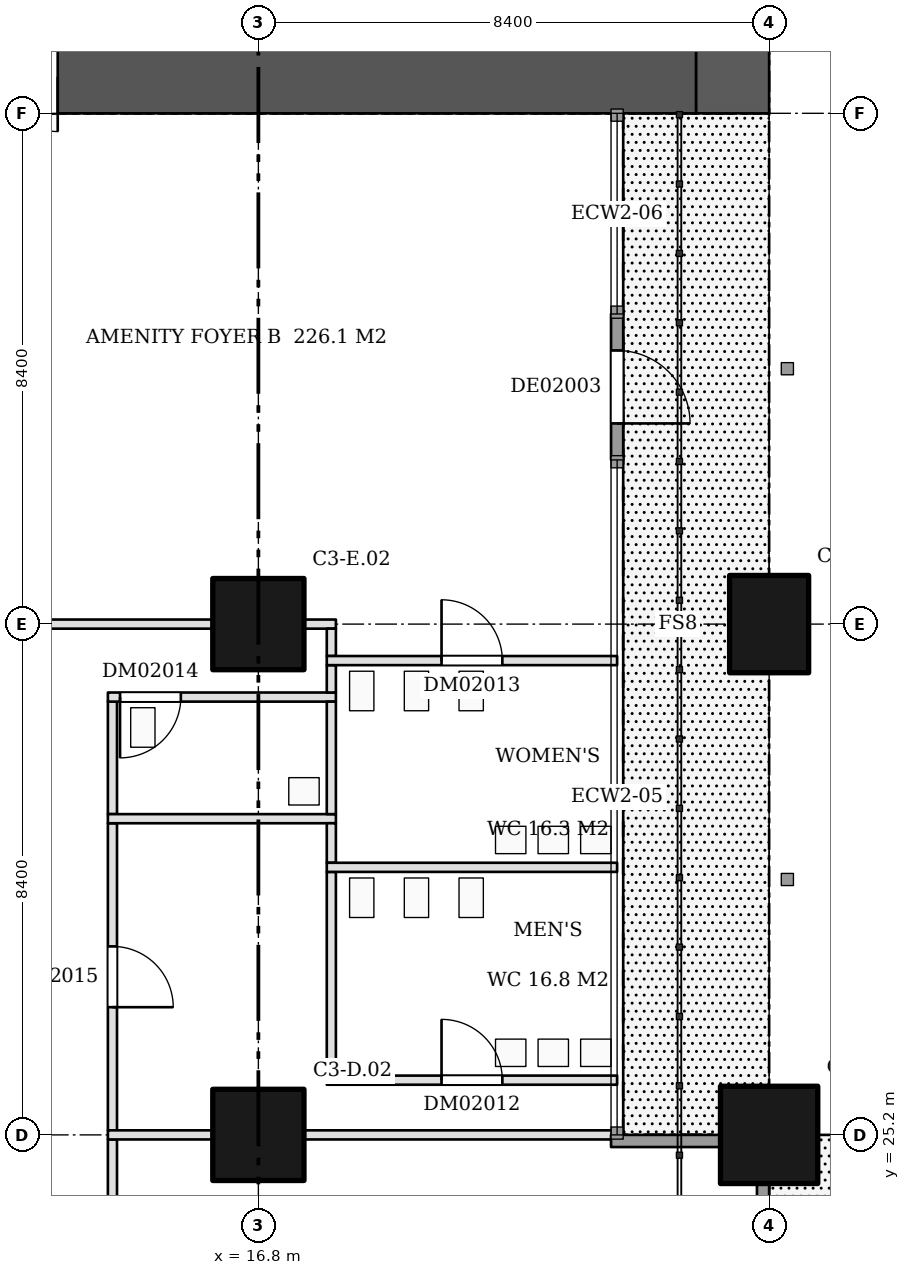
"""IFC4 building model, lengths in metres.
Left out: names, types, materials, properties, quantities, classifications, styles, units other than length and angle.
Written with IfcOpenShell. Run it as: python <this file> out.ifc"""

import sys

from ifc_helpers import new_model, si_unit, direction, frame, frame_2d, origin, origin_2d, place, context, subcontext, project, spatial, rectangle, extrude, element, fill, save


model = new_model("IFC4")
c1 = context("Model", 3, precision=1e-05, world=origin(), true_north=direction((0.0, 1.0)))
c2 = subcontext(c1, "Body", "Model", "MODEL_VIEW")
j1 = project(units=[si_unit("LENGTHUNIT", "METRE"), si_unit("PLANEANGLEUNIT", "RADIAN")], contexts=[c1])
p1 = place(None, origin())
s1 = spatial("IfcSite", under=j1, at=p1, CompositionType="ELEMENT")
p2 = place(p1, origin())
s2 = spatial("IfcBuilding", under=s1, at=p2, CompositionType="ELEMENT")
p3 = place(p2, frame((0.0, 0.0, 14.4)))
s3 = spatial("IfcBuildingStorey", under=s2, at=p3, CompositionType="ELEMENT", Elevation=14.4)
for number, where, z_axis, x_axis in (
    (1, (16.8, 25.2, 0.0), (0.0, 0.0, 1.0), (1.0, 0.0, 0.0)),
    (2, (16.8, 33.6, 0.0), (0.0, 0.0, 1.0), (1.0, 0.0, 0.0)),
):
    element("IfcColumn", number, at=place(p3, frame(where, z_axis=z_axis, x_axis=x_axis)), inside=s3, PredefinedType="COLUMN", context=c2, shape_type="SweptSolid", body=[
        extrude(rectangle(XDim=1.5, YDim=1.5, at=origin_2d()), origin(), (0.0, 0.0, 1.0), 5.1),
    ])
p4 = place(p3, frame((25.2, 25.2, 0.0), z_axis=(0.0, 0.0, 1.0), x_axis=(1.0, 0.0, 0.0)))
e3 = element("IfcColumn", 3, at=p4, inside=s3, PredefinedType="COLUMN", context=c2, shape_type="SweptSolid", body=[
    extrude(rectangle(XDim=1.6, YDim=1.6, at=origin_2d()), origin(), (0.0, 0.0, 1.0), 5.1),
])
p5 = place(p3, frame((25.2, 33.6, 0.0), z_axis=(0.0, 0.0, 1.0), x_axis=(0.0, 1.0, 0.0)))
e4 = element("IfcColumn", 4, at=p5, inside=s3, PredefinedType="COLUMN", context=c2, shape_type="SweptSolid", body=[
    extrude(rectangle(XDim=1.6, YDim=1.3, at=origin_2d()), origin(), (0.0, 0.0, 1.0), 5.1),
])
p6 = place(p3, frame((24.6, 58.8, 0.0), z_axis=(0.0, 0.0, 1.0), x_axis=(0.0, -1.0, 0.0)))
e5 = element("IfcWall", 5, at=p6, inside=s3, PredefinedType="SHEAR", context=c2, shape_type="SweptSolid", body=[
    extrude(rectangle(XDim=16.8, YDim=1.2, at=frame_2d((8.4, 0.0))), origin(), (0.0, 0.0, 1.0), 5.1),
])
p7 = place(p6, frame((1.8, 0.0, 0.5)))
e6 = element("IfcOpeningElement", 6, at=p7, cuts=e5, PredefinedType="OPENING", context=c2, shape_type="SweptSolid", body=[
    extrude(rectangle(XDim=1.8, YDim=2.4, at=frame_2d((0.9, 1.2))), frame((0.0, 0.61, 0.0), z_axis=(0.0, -1.0, 0.0), x_axis=(1.0, 0.0, 0.0)), (0.0, 0.0, 1.0), 1.22),
])
p8 = place(p6, frame((4.644, 0.0, 1.6)))
e7 = element("IfcOpeningElement", 7, at=p8, cuts=e5, PredefinedType="OPENING", context=c2, shape_type="SweptSolid", body=[
    extrude(rectangle(XDim=1.2, YDim=1.2, at=frame_2d((0.6, 0.6))), frame((0.0, 0.61, 0.0), z_axis=(0.0, -1.0, 0.0), x_axis=(1.0, 0.0, 0.0)), (0.0, 0.0, 1.0), 1.22),
])
p9 = place(p6, frame((6.45, 0.0, 1.6)))
e8 = element("IfcOpeningElement", 8, at=p9, cuts=e5, PredefinedType="OPENING", context=c2, shape_type="SweptSolid", body=[
    extrude(rectangle(XDim=1.8, YDim=1.2, at=frame_2d((0.9, 0.6))), frame((0.0, 0.61, 0.0), z_axis=(0.0, -1.0, 0.0), x_axis=(1.0, 0.0, 0.0)), (0.0, 0.0, 1.0), 1.22),
])
p10 = place(p6, frame((12.65, 0.0, 0.5)))
e9 = element("IfcOpeningElement", 9, at=p10, cuts=e5, PredefinedType="OPENING", context=c2, shape_type="SweptSolid", body=[
    extrude(rectangle(XDim=1.8, YDim=2.4, at=frame_2d((0.9, 1.2))), frame((0.0, 0.61, 0.0), z_axis=(0.0, -1.0, 0.0), x_axis=(1.0, 0.0, 0.0)), (0.0, 0.0, 1.0), 1.22),
])
p11 = place(p3, frame((9.6, 42.6, 0.0), z_axis=(0.0, 0.0, 1.0), x_axis=(1.0, 0.0, 0.0)))
e10 = element("IfcWall", 10, at=p11, inside=s3, PredefinedType="SHEAR", context=c2, shape_type="SweptSolid", body=[
    extrude(rectangle(XDim=14.4, YDim=1.2, at=frame_2d((7.2, 0.0))), origin(), (0.0, 0.0, 1.0), 5.1),
])
p12 = place(p11, frame((2.1, 0.0, 0.0)))
e11 = element("IfcOpeningElement", 11, at=p12, cuts=e10, PredefinedType="OPENING", context=c2, shape_type="SweptSolid", body=[
    extrude(rectangle(XDim=1.8, YDim=2.1, at=frame_2d((0.9, 1.05))), frame((0.0, 0.61, 0.0), z_axis=(0.0, -1.0, 0.0), x_axis=(1.0, 0.0, 0.0)), (0.0, 0.0, 1.0), 1.22),
])
p13 = place(p3, frame((10.8, 33.6, 0.0), z_axis=(0.0, 0.0, 1.0), x_axis=(1.0, 0.0, 0.0)))
e12 = element("IfcWall", 12, at=p13, inside=s3, PredefinedType="PARTITIONING", context=c2, shape_type="SweptSolid", body=[
    extrude(rectangle(XDim=5.25, YDim=0.15, at=frame_2d((2.625, 0.0))), origin(), (0.0, 0.0, 1.0), 5.1),
])
p14 = place(p3, frame((17.55, 33.6, 0.0), z_axis=(0.0, 0.0, 1.0), x_axis=(1.0, 0.0, 0.0)))
e13 = element("IfcWall", 13, at=p14, inside=s3, PredefinedType="PARTITIONING", context=c2, shape_type="SweptSolid", body=[
    extrude(rectangle(XDim=0.525, YDim=0.15, at=frame_2d((0.262, 0.0))), origin(), (0.0, 0.0, 1.0), 5.1),
])
p15 = place(p3, frame((14.4, 20.8, 0.0), z_axis=(0.0, 0.0, 1.0), x_axis=(0.0, 1.0, 0.0)))
e14 = element("IfcWall", 14, at=p15, inside=s3, PredefinedType="PARTITIONING", context=c2, shape_type="SweptSolid", body=[
    extrude(rectangle(XDim=4.325, YDim=0.15, at=frame_2d((2.163, 0.0))), origin(), (0.0, 0.0, 1.0), 5.1),
])
p16 = place(p15, frame((1.262, 0.0, 0.0)))
e15 = element("IfcOpeningElement", 15, at=p16, cuts=e14, PredefinedType="OPENING", context=c2, shape_type="SweptSolid", body=[
    extrude(rectangle(XDim=1.8, YDim=2.1, at=frame_2d((0.9, 1.05))), frame((0.0, 0.085, 0.0), z_axis=(0.0, -1.0, 0.0), x_axis=(1.0, 0.0, 0.0)), (0.0, 0.0, 1.0), 0.17),
])
p17 = place(p3, frame((14.4, 25.275, 0.0), z_axis=(0.0, 0.0, 1.0), x_axis=(0.0, 1.0, 0.0)))
e16 = element("IfcWall", 16, at=p17, inside=s3, PredefinedType="PARTITIONING", context=c2, shape_type="SweptSolid", body=[
    extrude(rectangle(XDim=5.05, YDim=0.15, at=frame_2d((2.525, 0.0))), origin(), (0.0, 0.0, 1.0), 5.1),
])
p18 = place(p17, frame((2.025, 0.0, 0.0)))
e17 = element("IfcOpeningElement", 17, at=p18, cuts=e16, PredefinedType="OPENING", context=c2, shape_type="SweptSolid", body=[
    extrude(rectangle(XDim=1.0, YDim=2.1, at=frame_2d((0.5, 1.05))), frame((0.0, 0.085, 0.0), z_axis=(0.0, -1.0, 0.0), x_axis=(1.0, 0.0, 0.0)), (0.0, 0.0, 1.0), 0.17),
])
p19 = place(p3, frame((14.325, 25.2, 0.0), z_axis=(0.0, 0.0, 1.0), x_axis=(1.0, 0.0, 0.0)))
e18 = element("IfcWall", 18, at=p19, inside=s3, PredefinedType="PARTITIONING", context=c2, shape_type="SweptSolid", body=[
    extrude(rectangle(XDim=1.725, YDim=0.15, at=frame_2d((0.863, 0.0))), origin(), (0.0, 0.0, 1.0), 5.1),
])
p20 = place(p3, frame((17.55, 25.2, 0.0), z_axis=(0.0, 0.0, 1.0), x_axis=(1.0, 0.0, 0.0)))
e19 = element("IfcWall", 19, at=p20, inside=s3, PredefinedType="PARTITIONING", context=c2, shape_type="SweptSolid", body=[
    extrude(rectangle(XDim=5.15, YDim=0.15, at=frame_2d((2.575, 0.0))), origin(), (0.0, 0.0, 1.0), 5.1),
])
p21 = place(p3, frame((14.4, 30.475, 0.0), z_axis=(0.0, 0.0, 1.0), x_axis=(0.0, 1.0, 0.0)))
e20 = element("IfcWall", 20, at=p21, inside=s3, PredefinedType="PARTITIONING", context=c2, shape_type="SweptSolid", body=[
    extrude(rectangle(XDim=1.85, YDim=0.15, at=frame_2d((0.925, 0.0))), origin(), (0.0, 0.0, 1.0), 5.1),
])
p22 = place(p3, frame((14.325, 30.4, 0.0), z_axis=(0.0, 0.0, 1.0), x_axis=(1.0, 0.0, 0.0)))
e21 = element("IfcWall", 21, at=p22, inside=s3, PredefinedType="PARTITIONING", context=c2, shape_type="SweptSolid", body=[
    extrude(rectangle(XDim=3.75, YDim=0.15, at=frame_2d((1.875, 0.0))), origin(), (0.0, 0.0, 1.0), 5.1),
])
p23 = place(p3, frame((14.325, 32.4, 0.0), z_axis=(0.0, 0.0, 1.0), x_axis=(1.0, 0.0, 0.0)))
e22 = element("IfcWall", 22, at=p23, inside=s3, PredefinedType="PARTITIONING", context=c2, shape_type="SweptSolid", body=[
    extrude(rectangle(XDim=3.75, YDim=0.15, at=frame_2d((1.875, 0.0))), origin(), (0.0, 0.0, 1.0), 5.1),
])
p24 = place(p23, frame((0.2, 0.0, 0.0)))
e23 = element("IfcOpeningElement", 23, at=p24, cuts=e22, PredefinedType="OPENING", context=c2, shape_type="SweptSolid", body=[
    extrude(rectangle(XDim=1.0, YDim=2.1, at=frame_2d((0.5, 1.05))), frame((0.0, 0.085, 0.0), z_axis=(0.0, -1.0, 0.0), x_axis=(1.0, 0.0, 0.0)), (0.0, 0.0, 1.0), 0.17),
])
p25 = place(p3, frame((18.0, 26.175, 0.0), z_axis=(0.0, 0.0, 1.0), x_axis=(0.0, 1.0, 0.0)))
e24 = element("IfcWall", 24, at=p25, inside=s3, PredefinedType="PARTITIONING", context=c2, shape_type="SweptSolid", body=[
    extrude(rectangle(XDim=3.35, YDim=0.15, at=frame_2d((1.675, 0.0))), origin(), (0.0, 0.0, 1.0), 5.1),
])
p26 = place(p3, frame((17.925, 26.1, 0.0), z_axis=(0.0, 0.0, 1.0), x_axis=(1.0, 0.0, 0.0)))
e25 = element("IfcWall", 25, at=p26, inside=s3, PredefinedType="PARTITIONING", context=c2, shape_type="SweptSolid", body=[
    extrude(rectangle(XDim=4.775, YDim=0.15, at=frame_2d((2.387, 0.0))), origin(), (0.0, 0.0, 1.0), 5.1),
])
p27 = place(p26, frame((1.887, 0.0, 0.0)))
e26 = element("IfcOpeningElement", 26, at=p27, cuts=e25, PredefinedType="OPENING", context=c2, shape_type="SweptSolid", body=[
    extrude(rectangle(XDim=1.0, YDim=2.1, at=frame_2d((0.5, 1.05))), frame((0.0, 0.085, 0.0), z_axis=(0.0, -1.0, 0.0), x_axis=(1.0, 0.0, 0.0)), (0.0, 0.0, 1.0), 0.17),
])
p28 = place(p3, frame((18.0, 29.675, 0.0), z_axis=(0.0, 0.0, 1.0), x_axis=(0.0, 1.0, 0.0)))
e27 = element("IfcWall", 27, at=p28, inside=s3, PredefinedType="PARTITIONING", context=c2, shape_type="SweptSolid", body=[
    extrude(rectangle(XDim=0.65, YDim=0.15, at=frame_2d((0.325, 0.0))), origin(), (0.0, 0.0, 1.0), 5.1),
])
p29 = place(p3, frame((17.925, 29.6, 0.0), z_axis=(0.0, 0.0, 1.0), x_axis=(1.0, 0.0, 0.0)))
e28 = element("IfcWall", 28, at=p29, inside=s3, PredefinedType="PARTITIONING", context=c2, shape_type="SweptSolid", body=[
    extrude(rectangle(XDim=4.775, YDim=0.15, at=frame_2d((2.387, 0.0))), origin(), (0.0, 0.0, 1.0), 5.1),
])
p30 = place(p3, frame((18.0, 30.475, 0.0), z_axis=(0.0, 0.0, 1.0), x_axis=(0.0, 1.0, 0.0)))
e29 = element("IfcWall", 29, at=p30, inside=s3, PredefinedType="PARTITIONING", context=c2, shape_type="SweptSolid", body=[
    extrude(rectangle(XDim=1.85, YDim=0.15, at=frame_2d((0.925, 0.0))), origin(), (0.0, 0.0, 1.0), 5.1),
])
for number, where, z_axis, x_axis in (
    (30, (18.0, 32.475, 0.0), (0.0, 0.0, 1.0), (0.0, 1.0, 0.0)),
    (31, (18.0, 33.075, 0.0), (0.0, 0.0, 1.0), (0.0, 1.0, 0.0)),
):
    element("IfcWall", number, at=place(p3, frame(where, z_axis=z_axis, x_axis=x_axis)), inside=s3, PredefinedType="PARTITIONING", context=c2, shape_type="SweptSolid", body=[
        extrude(rectangle(XDim=0.45, YDim=0.15, at=frame_2d((0.225, 0.0))), origin(), (0.0, 0.0, 1.0), 5.1),
    ])
p31 = place(p3, frame((17.925, 33.0, 0.0), z_axis=(0.0, 0.0, 1.0), x_axis=(1.0, 0.0, 0.0)))
e32 = element("IfcWall", 32, at=p31, inside=s3, PredefinedType="PARTITIONING", context=c2, shape_type="SweptSolid", body=[
    extrude(rectangle(XDim=4.775, YDim=0.15, at=frame_2d((2.387, 0.0))), origin(), (0.0, 0.0, 1.0), 5.1),
])
p32 = place(p31, frame((1.887, 0.0, 0.0)))
e33 = element("IfcOpeningElement", 33, at=p32, cuts=e32, PredefinedType="OPENING", context=c2, shape_type="SweptSolid", body=[
    extrude(rectangle(XDim=1.0, YDim=2.1, at=frame_2d((0.5, 1.05))), frame((0.0, 0.085, 0.0), z_axis=(0.0, -1.0, 0.0), x_axis=(1.0, 0.0, 0.0)), (0.0, 0.0, 1.0), 0.17),
])
p33 = place(p3, frame((25.1, 22.8, 0.0), z_axis=(0.0, 0.0, 1.0), x_axis=(0.0, 1.0, 0.0)))
e34 = element("IfcWall", 34, at=p33, inside=s3, PredefinedType="SOLIDWALL", context=c2, shape_type="SweptSolid", body=[
    extrude(rectangle(XDim=1.6, YDim=0.2, at=frame_2d((0.8, 0.0))), origin(), (0.0, 0.0, 1.0), 5.1),
])
p34 = place(p3, frame((24.4, 25.1, 0.0), z_axis=(0.0, 0.0, 1.0), x_axis=(-1.0, 0.0, 0.0)))
e35 = element("IfcWall", 35, at=p34, inside=s3, PredefinedType="SOLIDWALL", context=c2, shape_type="SweptSolid", body=[
    extrude(rectangle(XDim=1.8, YDim=0.2, at=frame_2d((0.9, 0.0))), origin(), (0.0, 0.0, 1.0), 5.1),
])
p35 = place(p3, frame((22.7, 36.3, 0.0), z_axis=(0.0, 0.0, 1.0), x_axis=(0.0, 1.0, 0.0)))
e36 = element("IfcWall", 36, at=p35, inside=s3, PredefinedType="SOLIDWALL", context=c2, shape_type="SweptSolid", body=[
    extrude(rectangle(XDim=2.4, YDim=0.2, at=frame_2d((1.2, 0.0))), origin(), (0.0, 0.0, 1.0), 5.1),
])
p36 = place(p35, frame((0.6, 0.0, 0.0)))
e37 = element("IfcOpeningElement", 37, at=p36, cuts=e36, PredefinedType="OPENING", context=c2, shape_type="SweptSolid", body=[
    extrude(rectangle(XDim=1.2, YDim=2.4, at=frame_2d((0.6, 1.2))), frame((0.0, 0.11, 0.0), z_axis=(0.0, -1.0, 0.0), x_axis=(1.0, 0.0, 0.0)), (0.0, 0.0, 1.0), 0.22),
])
p37 = place(p12, frame((1.8, 0.0, 0.0), z_axis=(0.0, 0.0, 1.0), x_axis=(-1.0, 0.0, 0.0)))
e38 = element("IfcDoor", 38, at=p37, inside=s3, OperationType="DOUBLE_DOOR_SINGLE_SWING", PredefinedType="DOOR", context=c2, shape_type="SweptSolid", body=[
    extrude(rectangle(XDim=1.8, YDim=2.1, at=frame_2d((0.9, 1.05))), frame((0.0, 0.025, 0.0), z_axis=(0.0, -1.0, 0.0), x_axis=(1.0, 0.0, 0.0)), (0.0, 0.0, 1.0), 0.05),
])
fill(e11, e38)
p38 = place(p27, origin())
e39 = element("IfcDoor", 39, at=p38, inside=s3, OperationType="SINGLE_SWING_LEFT", PredefinedType="DOOR", context=c2, shape_type="SweptSolid", body=[
    extrude(rectangle(XDim=1.0, YDim=2.1, at=frame_2d((0.5, 1.05))), frame((0.0, 0.025, 0.0), z_axis=(0.0, -1.0, 0.0), x_axis=(1.0, 0.0, 0.0)), (0.0, 0.0, 1.0), 0.05),
])
fill(e26, e39)
p39 = place(p32, origin())
e40 = element("IfcDoor", 40, at=p39, inside=s3, OperationType="SINGLE_SWING_LEFT", PredefinedType="DOOR", context=c2, shape_type="SweptSolid", body=[
    extrude(rectangle(XDim=1.0, YDim=2.1, at=frame_2d((0.5, 1.05))), frame((0.0, 0.025, 0.0), z_axis=(0.0, -1.0, 0.0), x_axis=(1.0, 0.0, 0.0)), (0.0, 0.0, 1.0), 0.05),
])
fill(e33, e40)
p40 = place(p24, frame((1.0, 0.0, 0.0), z_axis=(0.0, 0.0, 1.0), x_axis=(-1.0, 0.0, 0.0)))
e41 = element("IfcDoor", 41, at=p40, inside=s3, OperationType="SINGLE_SWING_RIGHT", PredefinedType="DOOR", context=c2, shape_type="SweptSolid", body=[
    extrude(rectangle(XDim=1.0, YDim=2.1, at=frame_2d((0.5, 1.05))), frame((0.0, 0.025, 0.0), z_axis=(0.0, -1.0, 0.0), x_axis=(1.0, 0.0, 0.0)), (0.0, 0.0, 1.0), 0.05),
])
fill(e23, e41)
p41 = place(p18, frame((1.0, 0.0, 0.0), z_axis=(0.0, 0.0, 1.0), x_axis=(-1.0, 0.0, 0.0)))
e42 = element("IfcDoor", 42, at=p41, inside=s3, OperationType="SINGLE_SWING_RIGHT", PredefinedType="DOOR", context=c2, shape_type="SweptSolid", body=[
    extrude(rectangle(XDim=1.0, YDim=2.1, at=frame_2d((0.5, 1.05))), frame((0.0, 0.025, 0.0), z_axis=(0.0, -1.0, 0.0), x_axis=(1.0, 0.0, 0.0)), (0.0, 0.0, 1.0), 0.05),
])
fill(e17, e42)
p42 = place(p36, frame((1.2, 0.0, 0.0), z_axis=(0.0, 0.0, 1.0), x_axis=(-1.0, 0.0, 0.0)))
e43 = element("IfcDoor", 43, at=p42, inside=s3, OperationType="SINGLE_SWING_RIGHT", PredefinedType="DOOR", context=c2, shape_type="SweptSolid", body=[
    extrude(rectangle(XDim=1.2, YDim=2.4, at=frame_2d((0.6, 1.2))), frame((0.0, 0.025, 0.0), z_axis=(0.0, -1.0, 0.0), x_axis=(1.0, 0.0, 0.0)), (0.0, 0.0, 1.0), 0.05),
])
fill(e37, e43)
save(model, sys.argv[1])
